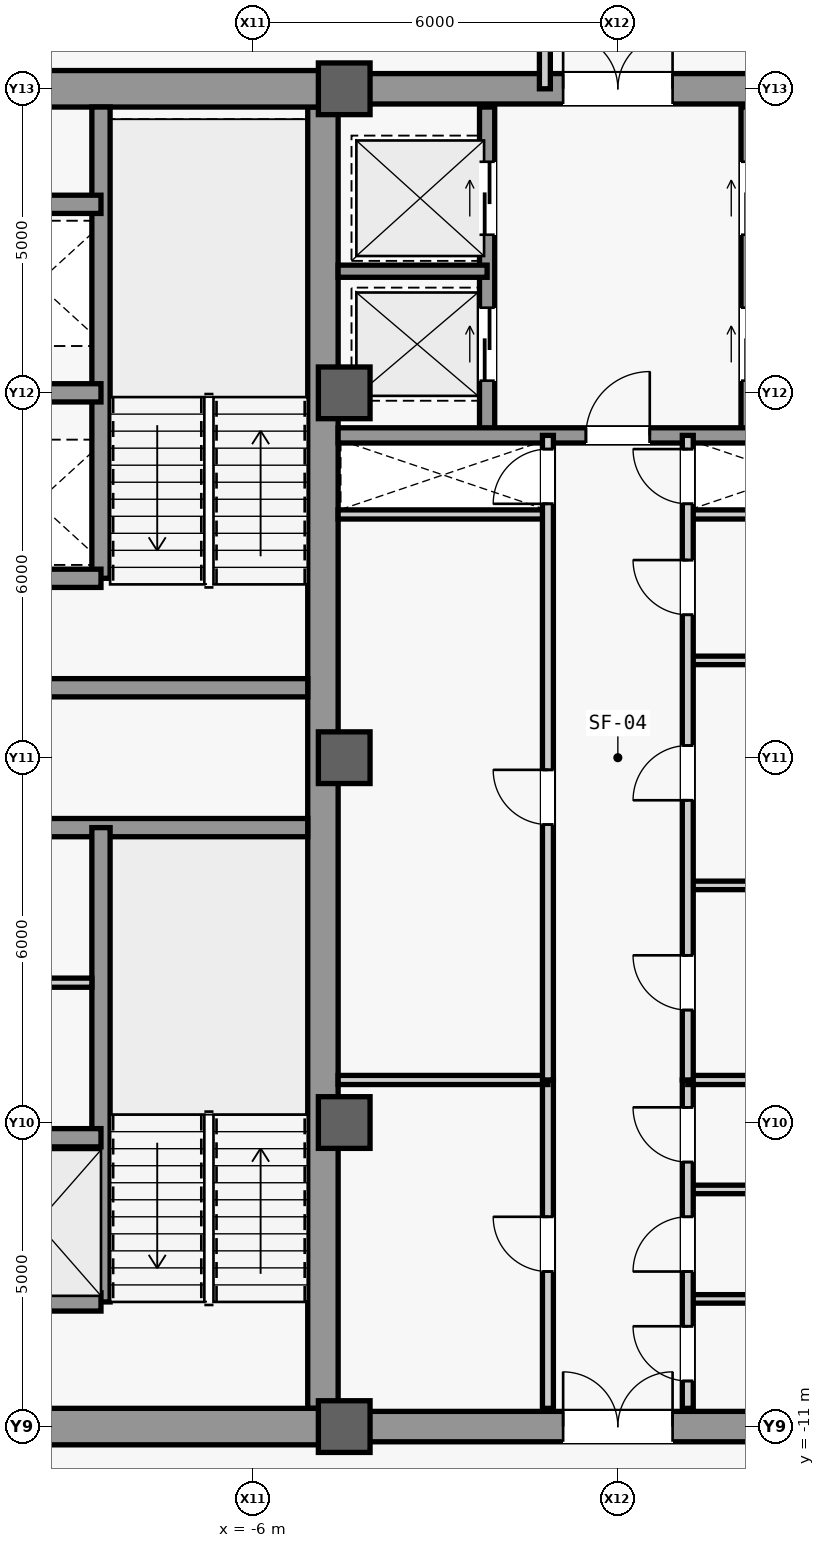
"""IFC4 building model, lengths in metres.
Left out: names, types, materials, properties, quantities, classifications, styles, units other than length and angle.
Written with IfcOpenShell. Run it as: python <this file> out.ifc"""

import sys

from ifc_helpers import new_model, si_unit, direction, frame, frame_2d, origin, origin_2d, place, context, subcontext, project, spatial, rectangle, extrude, source, transform, mapped, element, fill, save


model = new_model("IFC4")
c1 = context("Model", 3, precision=1e-05, world=origin(), true_north=direction((0.0, 1.0)))
c2 = subcontext(c1, "Body", "Model", "MODEL_VIEW")
j1 = project(units=[si_unit("LENGTHUNIT", "METRE"), si_unit("PLANEANGLEUNIT", "RADIAN")], contexts=[c1])
p1 = place(None, origin())
s1 = spatial("IfcSite", under=j1, at=p1, CompositionType="ELEMENT")
p2 = place(p1, origin())
s2 = spatial("IfcBuilding", under=s1, at=p2, CompositionType="ELEMENT")
p3 = place(p2, frame((0.0, 0.0, 223.1)))
s3 = spatial("IfcBuildingStorey", under=s2, at=p3, CompositionType="ELEMENT", Elevation=223.1)
m1 = source(origin(), c2, "Body", "SweptSolid", [
    extrude(rectangle(XDim=21.4, YDim=0.5, at=frame_2d((10.7, 0.0))), origin(), (0.0, 0.0, 1.0), 3.78),
])
p4 = place(p3, frame((-4.85, -10.7, 0.0), z_axis=(0.0, 0.0, 1.0), x_axis=(0.0, 1.0, 0.0)))
e1 = element("IfcWall", 1, at=p4, inside=s3, PredefinedType="SHEAR", context=c2, shape_type="MappedRepresentation", body=[
    mapped(m1, transform((0.0, 0.0, 0.0), scale=1.0)),
])
m2 = source(origin(), c2, "Body", "SweptSolid", [
    extrude(rectangle(XDim=5.9, YDim=0.6, at=frame_2d((2.95, 0.0))), origin(), (0.0, 0.0, 1.0), 3.78),
])
for number, where, z_axis, x_axis in (
    (2, (-10.75, -11.0, 0.0), (0.0, 0.0, 1.0), (1.0, 0.0, 0.0)),
    (3, (-10.75, 11.0, 0.0), (0.0, 0.0, 1.0), (1.0, 0.0, 0.0)),
):
    element("IfcWall", number, at=place(p3, frame(where, z_axis=z_axis, x_axis=x_axis)), inside=s3, PredefinedType="SHEAR", context=c2, shape_type="MappedRepresentation", body=[
        mapped(m2, transform((0.0, 0.0, 0.0), scale=1.0)),
    ])
m3 = source(origin(), c2, "Body", "SweptSolid", [
    extrude(rectangle(XDim=5.65, YDim=0.3, at=frame_2d((2.825, 0.0))), origin(), (0.0, 0.0, 1.0), 3.78),
])
for number, where, z_axis, x_axis in (
    (4, (-10.75, -1.15, 0.0), (0.0, 0.0, 1.0), (1.0, 0.0, 0.0)),
    (5, (-10.75, 1.15, 0.0), (0.0, 0.0, 1.0), (1.0, 0.0, 0.0)),
):
    element("IfcWall", number, at=place(p3, frame(where, z_axis=z_axis, x_axis=x_axis)), inside=s3, PredefinedType="SHEAR", context=c2, shape_type="MappedRepresentation", body=[
        mapped(m3, transform((0.0, 0.0, 0.0), scale=1.0)),
    ])
m4 = source(origin(), c2, "Body", "SweptSolid", [
    extrude(rectangle(XDim=9.2, YDim=0.5, at=frame_2d((4.6, 0.0))), origin(), (0.0, 0.0, 1.0), 3.78),
])
p5 = place(p3, frame((-4.6, -11.0, 0.0), z_axis=(0.0, 0.0, 1.0), x_axis=(1.0, 0.0, 0.0)))
e6 = element("IfcWall", 6, at=p5, inside=s3, PredefinedType="SHEAR", context=c2, shape_type="MappedRepresentation", body=[
    mapped(m4, transform((0.0, 0.0, 0.0), scale=1.0)),
])
m5 = source(origin(), c2, "Body", "SweptSolid", [
    extrude(rectangle(XDim=1.8, YDim=2.25, at=frame_2d((0.9, 1.125))), frame((0.0, 0.26, 0.0), z_axis=(0.0, -1.0, 0.0), x_axis=(1.0, 0.0, 0.0)), (0.0, 0.0, 1.0), 0.52),
])
p6 = place(p5, frame((3.7, 0.0, 0.0)))
e7 = element("IfcOpeningElement", 7, at=p6, cuts=e6, PredefinedType="OPENING", context=c2, shape_type="MappedRepresentation", body=[
    mapped(m5, transform((0.0, 0.0, 0.0), scale=1.0)),
])
p7 = place(p3, frame((-4.6, 11.0, 0.0), z_axis=(0.0, 0.0, 1.0), x_axis=(1.0, 0.0, 0.0)))
e8 = element("IfcWall", 8, at=p7, inside=s3, PredefinedType="SHEAR", context=c2, shape_type="MappedRepresentation", body=[
    mapped(m4, transform((0.0, 0.0, 0.0), scale=1.0)),
])
p8 = place(p7, frame((3.7, 0.0, 0.0)))
e9 = element("IfcOpeningElement", 9, at=p8, cuts=e8, PredefinedType="OPENING", context=c2, shape_type="MappedRepresentation", body=[
    mapped(m5, transform((0.0, 0.0, 0.0), scale=1.0)),
])
m6 = source(origin(), c2, "Body", "SweptSolid", [
    extrude(rectangle(XDim=0.85, YDim=0.85, at=origin_2d()), origin(), (0.0, 0.0, 1.0), 4.0),
])
for number, where, z_axis, x_axis in (
    (10, (-4.5, -11.0, 0.0), (0.0, 0.0, 1.0), (1.0, 0.0, 0.0)),
    (11, (-4.5, -6.0, 0.0), (0.0, 0.0, 1.0), (1.0, 0.0, 0.0)),
    (12, (-4.5, 0.0, 0.0), (0.0, 0.0, 1.0), (1.0, 0.0, 0.0)),
    (13, (-4.5, 6.0, 0.0), (0.0, 0.0, 1.0), (1.0, 0.0, 0.0)),
    (14, (-4.5, 11.0, 0.0), (0.0, 0.0, 1.0), (1.0, 0.0, 0.0)),
):
    element("IfcColumn", number, at=place(p3, frame(where, z_axis=z_axis, x_axis=x_axis)), inside=s3, PredefinedType="COLUMN", context=c2, shape_type="MappedRepresentation", body=[
        mapped(m6, transform((0.0, 0.0, 0.0), scale=1.0)),
    ])
m7 = source(origin(), c2, "Body", "SweptSolid", [
    extrude(rectangle(XDim=7.8, YDim=0.3, at=frame_2d((3.9, 0.0))), origin(), (0.0, 0.0, 1.0), 3.78),
])
p9 = place(p3, frame((-8.5, -8.95, 0.0), z_axis=(0.0, 0.0, 1.0), x_axis=(0.0, 1.0, 0.0)))
e15 = element("IfcWall", 15, at=p9, inside=s3, PredefinedType="SHEAR", context=c2, shape_type="MappedRepresentation", body=[
    mapped(m7, transform((0.0, 0.0, 0.0), scale=1.0)),
])
m8 = source(origin(), c2, "Body", "SweptSolid", [
    extrude(rectangle(XDim=2.2, YDim=0.3, at=frame_2d((1.1, 0.0))), origin(), (0.0, 0.0, 1.0), 3.78),
])
for number, where, z_axis, x_axis in (
    (16, (-10.7, -8.95, 0.0), (0.0, 0.0, 1.0), (1.0, 0.0, 0.0)),
    (17, (-10.7, -6.25, 0.0), (0.0, 0.0, 1.0), (1.0, 0.0, 0.0)),
):
    element("IfcWall", number, at=place(p3, frame(where, z_axis=z_axis, x_axis=x_axis)), inside=s3, PredefinedType="SHEAR", context=c2, shape_type="MappedRepresentation", body=[
        mapped(m8, transform((0.0, 0.0, 0.0), scale=1.0)),
    ])
m9 = source(origin(), c2, "Body", "SweptSolid", [
    extrude(rectangle(XDim=7.75, YDim=0.3, at=frame_2d((3.875, 0.0))), origin(), (0.0, 0.0, 1.0), 3.78),
])
p10 = place(p3, frame((-8.5, 2.95, 0.0), z_axis=(0.0, 0.0, 1.0), x_axis=(0.0, 1.0, 0.0)))
e18 = element("IfcWall", 18, at=p10, inside=s3, PredefinedType="SHEAR", context=c2, shape_type="MappedRepresentation", body=[
    mapped(m9, transform((0.0, 0.0, 0.0), scale=1.0)),
])
for number, where, z_axis, x_axis in (
    (19, (-10.7, 2.95, 0.0), (0.0, 0.0, 1.0), (1.0, 0.0, 0.0)),
    (20, (-10.7, 6.0, 0.0), (0.0, 0.0, 1.0), (1.0, 0.0, 0.0)),
    (21, (-10.7, 9.1, 0.0), (0.0, 0.0, 1.0), (1.0, 0.0, 0.0)),
):
    element("IfcWall", number, at=place(p3, frame(where, z_axis=z_axis, x_axis=x_axis)), inside=s3, PredefinedType="SHEAR", context=c2, shape_type="MappedRepresentation", body=[
        mapped(m8, transform((0.0, 0.0, 0.0), scale=1.0)),
    ])
m10 = source(origin(), c2, "Body", "SweptSolid", [
    extrude(rectangle(XDim=2.05, YDim=0.15, at=frame_2d((1.025, 0.0))), origin(), (0.0, 0.0, 1.0), 3.78),
])
p11 = place(p3, frame((-10.7, -3.7, 0.0), z_axis=(0.0, 0.0, 1.0), x_axis=(1.0, 0.0, 0.0)))
e22 = element("IfcWall", 22, at=p11, inside=s3, PredefinedType="PARTITIONING", context=c2, shape_type="MappedRepresentation", body=[
    mapped(m10, transform((0.0, 0.0, 0.0), scale=1.0)),
])
m11 = source(origin(), c2, "Body", "SweptSolid", [
    extrude(rectangle(XDim=3.45, YDim=0.15, at=frame_2d((1.725, 0.0))), origin(), (0.0, 0.0, 1.0), 3.78),
])
for number, where, z_axis, x_axis in (
    (23, (-4.6, 4.0, 0.0), (0.0, 0.0, 1.0), (1.0, 0.0, 0.0)),
    (24, (1.15, 4.0, 0.0), (0.0, 0.0, 1.0), (1.0, 0.0, 0.0)),
):
    element("IfcWall", number, at=place(p3, frame(where, z_axis=z_axis, x_axis=x_axis)), inside=s3, PredefinedType="PARTITIONING", context=c2, shape_type="MappedRepresentation", body=[
        mapped(m11, transform((0.0, 0.0, 0.0), scale=1.0)),
    ])
m12 = source(origin(), c2, "Body", "SweptSolid", [
    extrude(rectangle(XDim=5.4, YDim=0.18, at=frame_2d((2.7, 0.0))), origin(), (0.0, 0.0, 1.0), 3.78),
])
p12 = place(p3, frame((-1.15, -10.7, 0.0), z_axis=(0.0, 0.0, 1.0), x_axis=(0.0, 1.0, 0.0)))
e25 = element("IfcWall", 25, at=p12, inside=s3, PredefinedType="PARTITIONING", context=c2, shape_type="MappedRepresentation", body=[
    mapped(m12, transform((0.0, 0.0, 0.0), scale=1.0)),
])
m13 = source(origin(), c2, "Body", "SweptSolid", [
    extrude(rectangle(XDim=0.9, YDim=2.15, at=frame_2d((0.45, 1.075))), frame((0.0, 0.1, 0.0), z_axis=(0.0, -1.0, 0.0), x_axis=(1.0, 0.0, 0.0)), (0.0, 0.0, 1.0), 0.2),
])
p13 = place(p12, frame((2.25, 0.0, 0.0)))
e26 = element("IfcOpeningElement", 26, at=p13, cuts=e25, PredefinedType="OPENING", context=c2, shape_type="MappedRepresentation", body=[
    mapped(m13, transform((0.0, 0.0, 0.0), scale=1.0)),
])
m14 = source(origin(), c2, "Body", "SweptSolid", [
    extrude(rectangle(XDim=3.45, YDim=0.14, at=frame_2d((1.725, 0.0))), origin(), (0.0, 0.0, 1.0), 3.78),
])
for number, where, z_axis, x_axis in (
    (27, (1.15, -8.9, 0.0), (0.0, 0.0, 1.0), (1.0, 0.0, 0.0)),
    (28, (1.15, -7.1, 0.0), (0.0, 0.0, 1.0), (1.0, 0.0, 0.0)),
):
    element("IfcWall", number, at=place(p3, frame(where, z_axis=z_axis, x_axis=x_axis)), inside=s3, PredefinedType="PARTITIONING", context=c2, shape_type="MappedRepresentation", body=[
        mapped(m14, transform((0.0, 0.0, 0.0), scale=1.0)),
    ])
p14 = place(p3, frame((1.15, -10.7, 0.0), z_axis=(0.0, 0.0, 1.0), x_axis=(0.0, 1.0, 0.0)))
e29 = element("IfcWall", 29, at=p14, inside=s3, PredefinedType="PARTITIONING", context=c2, shape_type="MappedRepresentation", body=[
    mapped(m12, transform((0.0, 0.0, 0.0), scale=1.0)),
])
p15 = place(p14, frame((0.45, 0.0, 0.0)))
e30 = element("IfcOpeningElement", 30, at=p15, cuts=e29, PredefinedType="OPENING", context=c2, shape_type="MappedRepresentation", body=[
    mapped(m13, transform((0.0, 0.0, 0.0), scale=1.0)),
])
p16 = place(p14, frame((2.25, 0.0, 0.0)))
e31 = element("IfcOpeningElement", 31, at=p16, cuts=e29, PredefinedType="OPENING", context=c2, shape_type="MappedRepresentation", body=[
    mapped(m13, transform((0.0, 0.0, 0.0), scale=1.0)),
])
p17 = place(p14, frame((4.05, 0.0, 0.0)))
e32 = element("IfcOpeningElement", 32, at=p17, cuts=e29, PredefinedType="OPENING", context=c2, shape_type="MappedRepresentation", body=[
    mapped(m13, transform((0.0, 0.0, 0.0), scale=1.0)),
])
for number, where, z_axis, x_axis in (
    (33, (-4.6, -5.3, 0.0), (0.0, 0.0, 1.0), (1.0, 0.0, 0.0)),
    (34, (1.15, -5.3, 0.0), (0.0, 0.0, 1.0), (1.0, 0.0, 0.0)),
):
    element("IfcWall", number, at=place(p3, frame(where, z_axis=z_axis, x_axis=x_axis)), inside=s3, PredefinedType="PARTITIONING", context=c2, shape_type="MappedRepresentation", body=[
        mapped(m11, transform((0.0, 0.0, 0.0), scale=1.0)),
    ])
m15 = source(origin(), c2, "Body", "SweptSolid", [
    extrude(rectangle(XDim=5.4, YDim=0.25, at=frame_2d((2.7, 0.0))), origin(), (0.0, 0.0, 1.0), 3.78),
])
p18 = place(p3, frame((-2.15, 5.3, 0.0), z_axis=(0.0, 0.0, 1.0), x_axis=(0.0, 1.0, 0.0)))
e35 = element("IfcWall", 35, at=p18, inside=s3, PredefinedType="SHEAR", context=c2, shape_type="MappedRepresentation", body=[
    mapped(m15, transform((0.0, 0.0, 0.0), scale=1.0)),
])
m16 = source(origin(), c2, "Body", "SweptSolid", [
    extrude(rectangle(XDim=1.2, YDim=2.3, at=frame_2d((0.6, 1.15))), frame((0.0, 0.135, 0.0), z_axis=(0.0, -1.0, 0.0), x_axis=(1.0, 0.0, 0.0)), (0.0, 0.0, 1.0), 0.27),
])
p19 = place(p18, frame((3.3, 0.0, 0.0)))
e36 = element("IfcOpeningElement", 36, at=p19, cuts=e35, PredefinedType="OPENING", context=c2, shape_type="MappedRepresentation", body=[
    mapped(m16, transform((0.0, 0.0, 0.0), scale=1.0)),
])
p20 = place(p18, frame((0.9, 0.0, 0.0)))
e37 = element("IfcOpeningElement", 37, at=p20, cuts=e35, PredefinedType="OPENING", context=c2, shape_type="MappedRepresentation", body=[
    mapped(m16, transform((0.0, 0.0, 0.0), scale=1.0)),
])
p21 = place(p3, frame((2.15, 5.3, 0.0), z_axis=(0.0, 0.0, 1.0), x_axis=(0.0, 1.0, 0.0)))
e38 = element("IfcWall", 38, at=p21, inside=s3, PredefinedType="SHEAR", context=c2, shape_type="MappedRepresentation", body=[
    mapped(m15, transform((0.0, 0.0, 0.0), scale=1.0)),
])
p22 = place(p21, frame((3.3, 0.0, 0.0)))
e39 = element("IfcOpeningElement", 39, at=p22, cuts=e38, PredefinedType="OPENING", context=c2, shape_type="MappedRepresentation", body=[
    mapped(m16, transform((0.0, 0.0, 0.0), scale=1.0)),
])
p23 = place(p21, frame((0.9, 0.0, 0.0)))
e40 = element("IfcOpeningElement", 40, at=p23, cuts=e38, PredefinedType="OPENING", context=c2, shape_type="MappedRepresentation", body=[
    mapped(m16, transform((0.0, 0.0, 0.0), scale=1.0)),
])
m17 = source(origin(), c2, "Body", "SweptSolid", [
    extrude(rectangle(XDim=2.45, YDim=0.2, at=frame_2d((1.225, 0.0))), origin(), (0.0, 0.0, 1.0), 3.78),
])
p24 = place(p3, frame((-4.6, 8.0, 0.0), z_axis=(0.0, 0.0, 1.0), x_axis=(1.0, 0.0, 0.0)))
e41 = element("IfcWall", 41, at=p24, inside=s3, PredefinedType="SHEAR", context=c2, shape_type="MappedRepresentation", body=[
    mapped(m17, transform((0.0, 0.0, 0.0), scale=1.0)),
])
m18 = source(origin(), c2, "Body", "SweptSolid", [
    extrude(rectangle(XDim=9.2, YDim=0.25, at=frame_2d((4.6, 0.0))), origin(), (0.0, 0.0, 1.0), 3.78),
])
p25 = place(p3, frame((-4.6, 5.3, 0.0), z_axis=(0.0, 0.0, 1.0), x_axis=(1.0, 0.0, 0.0)))
e42 = element("IfcWall", 42, at=p25, inside=s3, PredefinedType="SHEAR", context=c2, shape_type="MappedRepresentation", body=[
    mapped(m18, transform((0.0, 0.0, 0.0), scale=1.0)),
])
m19 = source(origin(), c2, "Body", "SweptSolid", [
    extrude(rectangle(XDim=1.05, YDim=2.2, at=frame_2d((0.525, 1.1))), frame((0.0, 0.135, 0.0), z_axis=(0.0, -1.0, 0.0), x_axis=(1.0, 0.0, 0.0)), (0.0, 0.0, 1.0), 0.27),
])
p26 = place(p25, frame((4.075, 0.0, 0.0)))
e43 = element("IfcOpeningElement", 43, at=p26, cuts=e42, PredefinedType="OPENING", context=c2, shape_type="MappedRepresentation", body=[
    mapped(m19, transform((0.0, 0.0, 0.0), scale=1.0)),
])
m20 = source(origin(), c2, "Body", "SweptSolid", [
    extrude(rectangle(XDim=10.6, YDim=0.18, at=frame_2d((5.3, 0.0))), origin(), (0.0, 0.0, 1.0), 3.78),
])
p27 = place(p3, frame((-1.15, -5.3, 0.0), z_axis=(0.0, 0.0, 1.0), x_axis=(0.0, 1.0, 0.0)))
e44 = element("IfcWall", 44, at=p27, inside=s3, PredefinedType="PARTITIONING", context=c2, shape_type="MappedRepresentation", body=[
    mapped(m20, transform((0.0, 0.0, 0.0), scale=1.0)),
])
p28 = place(p27, frame((4.2, 0.0, 0.0)))
e45 = element("IfcOpeningElement", 45, at=p28, cuts=e44, PredefinedType="OPENING", context=c2, shape_type="MappedRepresentation", body=[
    mapped(m13, transform((0.0, 0.0, 0.0), scale=1.0)),
])
p29 = place(p27, frame((9.475, 0.0, 0.0)))
e46 = element("IfcOpeningElement", 46, at=p29, cuts=e44, PredefinedType="OPENING", context=c2, shape_type="MappedRepresentation", body=[
    mapped(m13, transform((0.0, 0.0, 0.0), scale=1.0)),
])
for number, where, z_axis, x_axis in (
    (47, (1.15, -2.1, 0.0), (0.0, 0.0, 1.0), (1.0, 0.0, 0.0)),
    (48, (1.15, 1.6, 0.0), (0.0, 0.0, 1.0), (1.0, 0.0, 0.0)),
):
    element("IfcWall", number, at=place(p3, frame(where, z_axis=z_axis, x_axis=x_axis)), inside=s3, PredefinedType="PARTITIONING", context=c2, shape_type="MappedRepresentation", body=[
        mapped(m14, transform((0.0, 0.0, 0.0), scale=1.0)),
    ])
p30 = place(p3, frame((1.15, -5.3, 0.0), z_axis=(0.0, 0.0, 1.0), x_axis=(0.0, 1.0, 0.0)))
e49 = element("IfcWall", 49, at=p30, inside=s3, PredefinedType="PARTITIONING", context=c2, shape_type="MappedRepresentation", body=[
    mapped(m20, transform((0.0, 0.0, 0.0), scale=1.0)),
])
p31 = place(p30, frame((1.15, 0.0, 0.0)))
e50 = element("IfcOpeningElement", 50, at=p31, cuts=e49, PredefinedType="OPENING", context=c2, shape_type="MappedRepresentation", body=[
    mapped(m13, transform((0.0, 0.0, 0.0), scale=1.0)),
])
p32 = place(p30, frame((4.6, 0.0, 0.0)))
e51 = element("IfcOpeningElement", 51, at=p32, cuts=e49, PredefinedType="OPENING", context=c2, shape_type="MappedRepresentation", body=[
    mapped(m13, transform((0.0, 0.0, 0.0), scale=1.0)),
])
p33 = place(p30, frame((7.65, 0.0, 0.0)))
e52 = element("IfcOpeningElement", 52, at=p33, cuts=e49, PredefinedType="OPENING", context=c2, shape_type="MappedRepresentation", body=[
    mapped(m13, transform((0.0, 0.0, 0.0), scale=1.0)),
])
p34 = place(p30, frame((9.475, 0.0, 0.0)))
e53 = element("IfcOpeningElement", 53, at=p34, cuts=e49, PredefinedType="OPENING", context=c2, shape_type="MappedRepresentation", body=[
    mapped(m13, transform((0.0, 0.0, 0.0), scale=1.0)),
])
m21 = source(origin(), c2, "Body", "SweptSolid", [
    extrude(rectangle(XDim=3.1, YDim=0.18, at=frame_2d((1.55, 0.0))), origin(), (0.0, 0.0, 1.0), 3.78),
])
p35 = place(p3, frame((-1.2, 11.0, 0.0), z_axis=(0.0, 0.0, 1.0), x_axis=(0.0, 1.0, 0.0)))
e54 = element("IfcWall", 54, at=p35, inside=s3, PredefinedType="PARTITIONING", context=c2, shape_type="MappedRepresentation", body=[
    mapped(m21, transform((0.0, 0.0, 0.0), scale=1.0)),
])
m22 = source(origin(), c2, "Body", "SweptSolid", [
    extrude(rectangle(XDim=0.9, YDim=2.15, at=frame_2d((0.45, 1.075))), frame((0.0, 0.025, 0.0), z_axis=(0.0, -1.0, 0.0), x_axis=(1.0, 0.0, 0.0)), (0.0, 0.0, 1.0), 0.05),
])
p36 = place(p13, origin())
e55 = element("IfcDoor", 55, at=p36, inside=s3, OperationType="SINGLE_SWING_RIGHT", PredefinedType="DOOR", context=c2, shape_type="MappedRepresentation", body=[
    mapped(m22, transform((0.0, 0.0, 0.0), scale=1.0)),
])
fill(e26, e55)
p37 = place(p15, origin())
e56 = element("IfcDoor", 56, at=p37, inside=s3, OperationType="SINGLE_SWING_RIGHT", PredefinedType="DOOR", context=c2, shape_type="MappedRepresentation", body=[
    mapped(m22, transform((0.0, 0.0, 0.0), scale=1.0)),
])
fill(e30, e56)
p38 = place(p16, origin())
e57 = element("IfcDoor", 57, at=p38, inside=s3, OperationType="SINGLE_SWING_LEFT", PredefinedType="DOOR", context=c2, shape_type="MappedRepresentation", body=[
    mapped(m22, transform((0.0, 0.0, 0.0), scale=1.0)),
])
fill(e31, e57)
p39 = place(p17, origin())
e58 = element("IfcDoor", 58, at=p39, inside=s3, OperationType="SINGLE_SWING_RIGHT", PredefinedType="DOOR", context=c2, shape_type="MappedRepresentation", body=[
    mapped(m22, transform((0.0, 0.0, 0.0), scale=1.0)),
])
fill(e32, e58)
m23 = source(origin(), c2, "Body", "SweptSolid", [
    extrude(rectangle(XDim=1.8, YDim=2.25, at=frame_2d((0.9, 1.125))), frame((0.0, 0.025, 0.0), z_axis=(0.0, -1.0, 0.0), x_axis=(1.0, 0.0, 0.0)), (0.0, 0.0, 1.0), 0.05),
])
p40 = place(p6, origin())
e59 = element("IfcDoor", 59, at=p40, inside=s3, OperationType="SINGLE_SWING_LEFT", PredefinedType="DOOR", context=c2, shape_type="MappedRepresentation", body=[
    mapped(m23, transform((0.0, 0.0, 0.0), scale=1.0)),
])
fill(e7, e59)
m24 = source(origin(), c2, "Body", "SweptSolid", [
    extrude(rectangle(XDim=1.05, YDim=2.2, at=frame_2d((0.525, 1.1))), frame((0.0, 0.025, 0.0), z_axis=(0.0, -1.0, 0.0), x_axis=(1.0, 0.0, 0.0)), (0.0, 0.0, 1.0), 0.05),
])
p41 = place(p26, origin())
e60 = element("IfcDoor", 60, at=p41, inside=s3, OperationType="SINGLE_SWING_RIGHT", PredefinedType="DOOR", context=c2, shape_type="MappedRepresentation", body=[
    mapped(m24, transform((0.0, 0.0, 0.0), scale=1.0)),
])
fill(e43, e60)
p42 = place(p8, origin())
e61 = element("IfcDoor", 61, at=p42, inside=s3, OperationType="SINGLE_SWING_RIGHT", PredefinedType="DOOR", context=c2, shape_type="MappedRepresentation", body=[
    mapped(m23, transform((0.0, 0.0, 0.0), scale=1.0)),
])
fill(e9, e61)
p43 = place(p28, origin())
e62 = element("IfcDoor", 62, at=p43, inside=s3, OperationType="SINGLE_SWING_RIGHT", PredefinedType="DOOR", context=c2, shape_type="MappedRepresentation", body=[
    mapped(m22, transform((0.0, 0.0, 0.0), scale=1.0)),
])
fill(e45, e62)
p44 = place(p31, origin())
e63 = element("IfcDoor", 63, at=p44, inside=s3, OperationType="SINGLE_SWING_RIGHT", PredefinedType="DOOR", context=c2, shape_type="MappedRepresentation", body=[
    mapped(m22, transform((0.0, 0.0, 0.0), scale=1.0)),
])
fill(e50, e63)
p45 = place(p32, origin())
e64 = element("IfcDoor", 64, at=p45, inside=s3, OperationType="SINGLE_SWING_LEFT", PredefinedType="DOOR", context=c2, shape_type="MappedRepresentation", body=[
    mapped(m22, transform((0.0, 0.0, 0.0), scale=1.0)),
])
fill(e51, e64)
p46 = place(p33, origin())
e65 = element("IfcDoor", 65, at=p46, inside=s3, OperationType="SINGLE_SWING_RIGHT", PredefinedType="DOOR", context=c2, shape_type="MappedRepresentation", body=[
    mapped(m22, transform((0.0, 0.0, 0.0), scale=1.0)),
])
fill(e52, e65)
p47 = place(p29, origin())
e66 = element("IfcDoor", 66, at=p47, inside=s3, OperationType="SINGLE_SWING_LEFT", PredefinedType="DOOR", context=c2, shape_type="MappedRepresentation", body=[
    mapped(m22, transform((0.0, 0.0, 0.0), scale=1.0)),
])
fill(e46, e66)
p48 = place(p34, origin())
e67 = element("IfcDoor", 67, at=p48, inside=s3, OperationType="SINGLE_SWING_RIGHT", PredefinedType="DOOR", context=c2, shape_type="MappedRepresentation", body=[
    mapped(m22, transform((0.0, 0.0, 0.0), scale=1.0)),
])
fill(e53, e67)
m25 = source(origin(), c2, "Body", "SweptSolid", [
    extrude(rectangle(XDim=1.2, YDim=2.3, at=frame_2d((0.6, 1.15))), frame((0.0, 0.025, 0.0), z_axis=(0.0, -1.0, 0.0), x_axis=(1.0, 0.0, 0.0)), (0.0, 0.0, 1.0), 0.05),
])
p49 = place(p19, origin())
e68 = element("IfcDoor", 68, at=p49, inside=s3, OperationType="SLIDING_TO_LEFT", PredefinedType="DOOR", context=c2, shape_type="MappedRepresentation", body=[
    mapped(m25, transform((0.0, 0.0, 0.0), scale=1.0)),
])
fill(e36, e68)
p50 = place(p20, origin())
e69 = element("IfcDoor", 69, at=p50, inside=s3, OperationType="SLIDING_TO_LEFT", PredefinedType="DOOR", context=c2, shape_type="MappedRepresentation", body=[
    mapped(m25, transform((0.0, 0.0, 0.0), scale=1.0)),
])
fill(e37, e69)
save(model, sys.argv[1])
